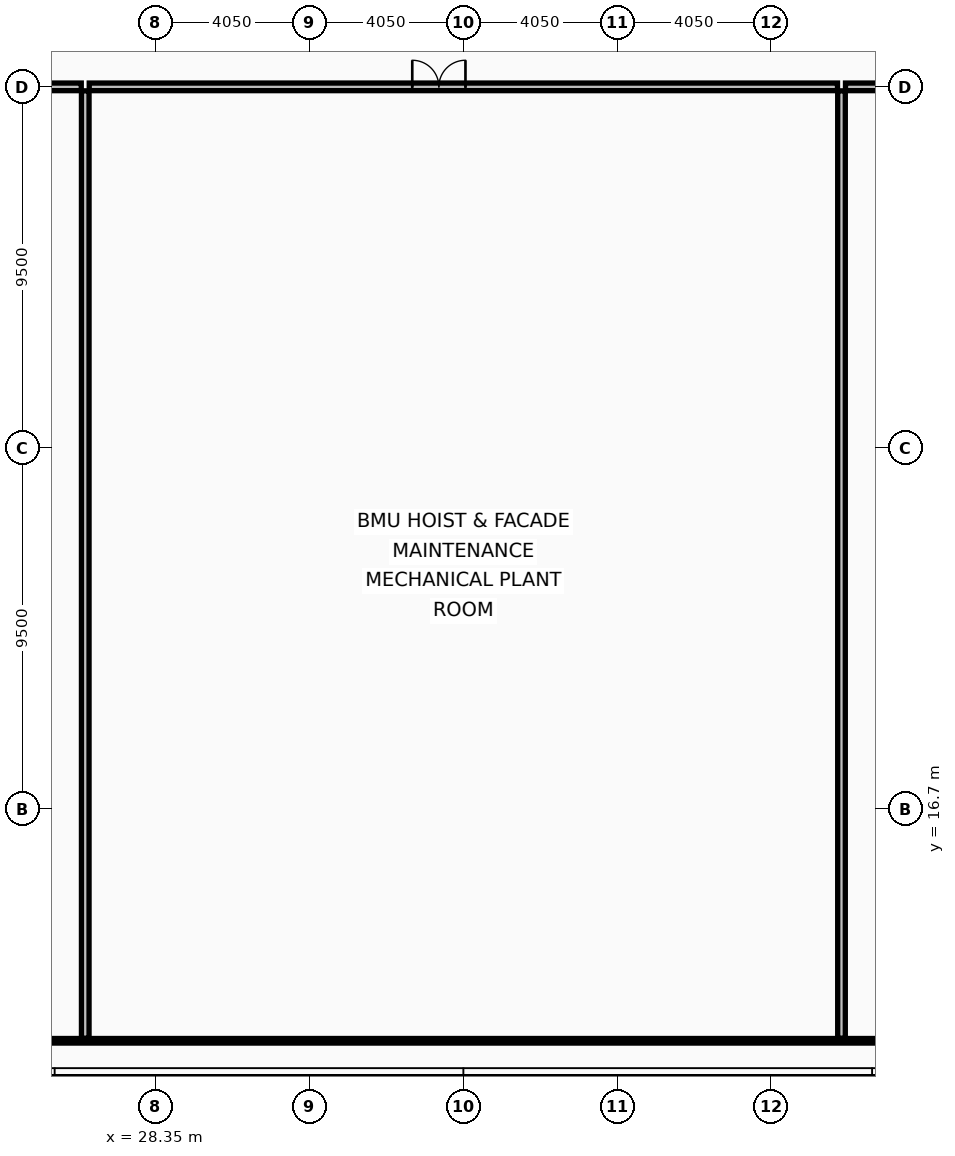
"""IFC4 building model, lengths in metres.
Left out: names, types, materials, properties, quantities, classifications, styles, units other than length and angle.
Written with IfcOpenShell. Run it as: python <this file> out.ifc"""

import sys

from ifc_helpers import new_model, si_unit, direction, frame, frame_2d, origin, place, context, subcontext, project, spatial, rectangle, extrude, element, fill, save


model = new_model("IFC4")
c1 = context("Model", 3, precision=1e-05, world=origin(), true_north=direction((0.0, 1.0)))
c2 = subcontext(c1, "Body", "Model", "MODEL_VIEW")
j1 = project(units=[si_unit("LENGTHUNIT", "METRE"), si_unit("PLANEANGLEUNIT", "RADIAN")], contexts=[c1])
p1 = place(None, origin())
s1 = spatial("IfcSite", under=j1, at=p1, CompositionType="ELEMENT")
p2 = place(p1, origin())
s2 = spatial("IfcBuilding", under=s1, at=p2, CompositionType="ELEMENT")
p3 = place(p2, frame((0.0, 0.0, 373.0)))
s3 = spatial("IfcBuildingStorey", under=s2, at=p3, CompositionType="ELEMENT", Elevation=373.0)
p4 = place(p3, frame((12.095, 35.7, 0.0), z_axis=(0.0, 0.0, 1.0), x_axis=(1.0, 0.0, 0.0)))
e1 = element("IfcWall", 1, at=p4, inside=s3, PredefinedType="PARTITIONING", context=c2, shape_type="SweptSolid", body=[
    extrude(rectangle(XDim=14.3, YDim=0.2, at=frame_2d((7.15, 0.0))), origin(), (0.0, 0.0, 1.0), 4.79),
])
p5 = place(p4, frame((6.65, 0.0, 0.0)))
e2 = element("IfcOpeningElement", 2, at=p5, cuts=e1, PredefinedType="OPENING", context=c2, shape_type="SweptSolid", body=[
    extrude(rectangle(XDim=1.4, YDim=2.15, at=frame_2d((0.7, 1.075))), frame((0.0, 0.11, 0.0), z_axis=(0.0, -1.0, 0.0), x_axis=(1.0, 0.0, 0.0)), (0.0, 0.0, 1.0), 0.22),
])
p6 = place(p3, frame((26.605, 35.7, 0.0), z_axis=(0.0, 0.0, 1.0), x_axis=(1.0, 0.0, 0.0)))
e3 = element("IfcWall", 3, at=p6, inside=s3, PredefinedType="PARTITIONING", context=c2, shape_type="SweptSolid", body=[
    extrude(rectangle(XDim=19.69, YDim=0.2, at=frame_2d((9.845, 0.0))), origin(), (0.0, 0.0, 1.0), 5.03),
])
p7 = place(p6, frame((8.5, 0.0, 0.0)))
e4 = element("IfcOpeningElement", 4, at=p7, cuts=e3, PredefinedType="OPENING", context=c2, shape_type="SweptSolid", body=[
    extrude(rectangle(XDim=1.4, YDim=2.15, at=frame_2d((0.7, 1.075))), frame((0.0, 0.11, 0.0), z_axis=(0.0, -1.0, 0.0), x_axis=(1.0, 0.0, 0.0)), (0.0, 0.0, 1.0), 0.22),
])
p8 = place(p3, frame((46.505, 35.7, 0.0), z_axis=(0.0, 0.0, 1.0), x_axis=(1.0, 0.0, 0.0)))
e5 = element("IfcWall", 5, at=p8, inside=s3, PredefinedType="PARTITIONING", context=c2, shape_type="SweptSolid", body=[
    extrude(rectangle(XDim=14.3, YDim=0.2, at=frame_2d((7.15, 0.0))), origin(), (0.0, 0.0, 1.0), 4.79),
])
p9 = place(p8, frame((5.5, 0.0, 0.0)))
e6 = element("IfcOpeningElement", 6, at=p9, cuts=e5, PredefinedType="OPENING", context=c2, shape_type="SweptSolid", body=[
    extrude(rectangle(XDim=1.4, YDim=2.15, at=frame_2d((0.7, 1.075))), frame((0.0, 0.11, 0.0), z_axis=(0.0, -1.0, 0.0), x_axis=(1.0, 0.0, 0.0)), (0.0, 0.0, 1.0), 0.22),
])
for number, where, z_axis, x_axis in (
    (7, (26.5, 10.665, 0.0), (0.0, 0.0, 1.0), (0.0, 1.0, 0.0)),
    (8, (46.4, 10.665, 0.0), (0.0, 0.0, 1.0), (0.0, 1.0, 0.0)),
):
    element("IfcWall", number, at=place(p3, frame(where, z_axis=z_axis, x_axis=x_axis)), inside=s3, PredefinedType="PARTITIONING", context=c2, shape_type="SweptSolid", body=[
        extrude(rectangle(XDim=24.93, YDim=0.2, at=frame_2d((12.465, 0.0))), origin(), (0.0, 0.0, 1.0), 5.03),
    ])
p10 = place(p3, frame((12.095, 10.6, 0.0), z_axis=(0.0, 0.0, 1.0), x_axis=(1.0, 0.0, 0.0)))
e9 = element("IfcWall", 9, at=p10, inside=s3, PredefinedType="PARTITIONING", context=c2, shape_type="SweptSolid", body=[
    extrude(rectangle(XDim=48.71, YDim=0.12, at=frame_2d((24.355, 0.0))), origin(), (0.0, 0.0, 1.0), 4.79),
])
p11 = place(p7, origin())
e10 = element("IfcDoor", 10, at=p11, inside=s3, OperationType="DOUBLE_DOOR_SINGLE_SWING", PredefinedType="DOOR", context=c2, shape_type="SweptSolid", body=[
    extrude(rectangle(XDim=1.4, YDim=2.15, at=frame_2d((0.7, 1.075))), frame((0.0, 0.025, 0.0), z_axis=(0.0, -1.0, 0.0), x_axis=(1.0, 0.0, 0.0)), (0.0, 0.0, 1.0), 0.05),
])
fill(e4, e10)
save(model, sys.argv[1])
